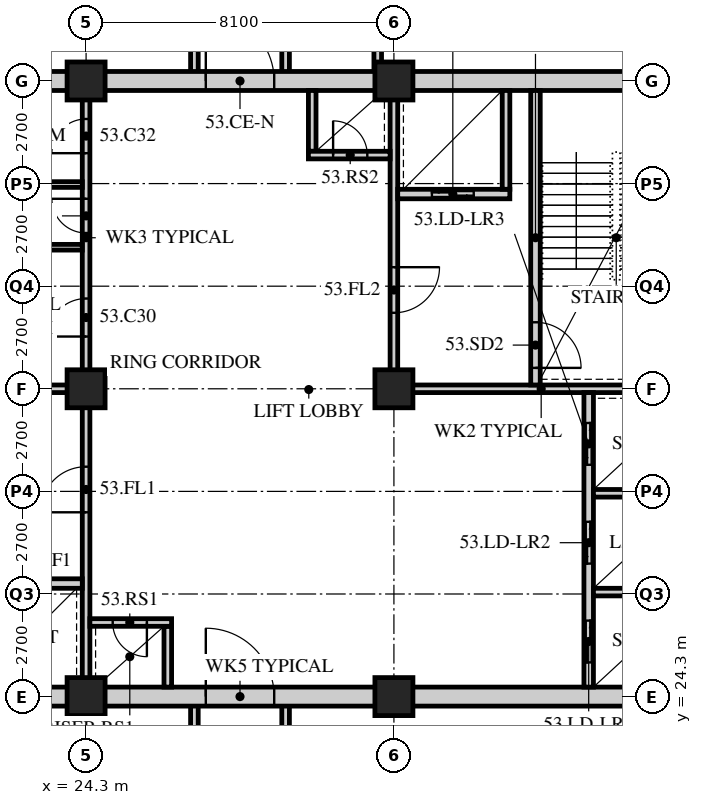
"""IFC4 building model, lengths in metres.
Left out: names, types, materials, properties, quantities, classifications, styles, units other than length and angle.
Written with IfcOpenShell. Run it as: python <this file> out.ifc"""

import sys

from ifc_helpers import new_model, si_unit, direction, frame, frame_2d, origin, origin_2d, place, context, subcontext, project, spatial, rectangle, hollow_rectangle, extrude, element, fill, save


model = new_model("IFC4")
c1 = context("Model", 3, precision=1e-05, world=origin(), true_north=direction((0.0, 1.0)))
c2 = subcontext(c1, "Body", "Model", "MODEL_VIEW")
j1 = project(units=[si_unit("LENGTHUNIT", "METRE"), si_unit("PLANEANGLEUNIT", "RADIAN")], contexts=[c1])
p1 = place(None, origin())
s1 = spatial("IfcSite", under=j1, at=p1, CompositionType="ELEMENT")
p2 = place(p1, origin())
s2 = spatial("IfcBuilding", under=s1, at=p2, CompositionType="ELEMENT")
p3 = place(p2, frame((0.0, 0.0, 206.4)))
s3 = spatial("IfcBuildingStorey", under=s2, at=p3, CompositionType="ELEMENT", Elevation=206.4)
for number, where, z_axis, x_axis in (
    (1, (24.3, 24.3, 0.0), (0.0, 0.0, 1.0), (1.0, 0.0, 0.0)),
    (2, (24.3, 32.4, 0.0), (0.0, 0.0, 1.0), (1.0, 0.0, 0.0)),
    (3, (24.3, 40.5, 0.0), (0.0, 0.0, 1.0), (1.0, 0.0, 0.0)),
    (4, (32.4, 24.3, 0.0), (0.0, 0.0, 1.0), (1.0, 0.0, 0.0)),
    (5, (32.4, 32.4, 0.0), (0.0, 0.0, 1.0), (1.0, 0.0, 0.0)),
    (6, (32.4, 40.5, 0.0), (0.0, 0.0, 1.0), (1.0, 0.0, 0.0)),
):
    element("IfcColumn", number, at=place(p3, frame(where, z_axis=z_axis, x_axis=x_axis)), inside=s3, PredefinedType="COLUMN", context=c2, shape_type="SweptSolid", body=[
        extrude(hollow_rectangle(XDim=1.0, YDim=1.0, WallThickness=0.1, at=origin_2d()), origin(), (0.0, 0.0, 1.0), 3.6),
    ])
for number, where, z_axis, x_axis in (
    (7, (27.15, 20.7, 0.0), (0.0, 0.0, 1.0), (0.0, 1.0, 0.0)),
    (8, (29.55, 20.7, 0.0), (0.0, 0.0, 1.0), (0.0, 1.0, 0.0)),
):
    element("IfcWall", number, at=place(p3, frame(where, z_axis=z_axis, x_axis=x_axis)), inside=s3, PredefinedType="SOLIDWALL", context=c2, shape_type="SweptSolid", body=[
        extrude(rectangle(XDim=3.6, YDim=0.2, at=frame_2d((1.8, 0.0))), origin(), (0.0, 0.0, 1.0), 3.39),
    ])
p4 = place(p3, frame((31.974, 45.45, 0.0), z_axis=(0.0, 0.0, 1.0), x_axis=(0.0, -1.0, 0.0)))
e9 = element("IfcWall", 9, at=p4, inside=s3, PredefinedType="SOLIDWALL", context=c2, shape_type="SweptSolid", body=[
    extrude(rectangle(XDim=4.95, YDim=0.2, at=frame_2d((2.475, 0.0))), origin(), (0.0, 0.0, 1.0), 2.69),
])
for number, where, z_axis, x_axis in (
    (10, (27.15, 40.5, 0.0), (0.0, 0.0, 1.0), (0.0, 1.0, 0.0)),
    (11, (29.55, 40.5, 0.0), (0.0, 0.0, 1.0), (0.0, 1.0, 0.0)),
):
    element("IfcWall", number, at=place(p3, frame(where, z_axis=z_axis, x_axis=x_axis)), inside=s3, PredefinedType="SOLIDWALL", context=c2, shape_type="SweptSolid", body=[
        extrude(rectangle(XDim=4.95, YDim=0.2, at=frame_2d((2.475, 0.0))), origin(), (0.0, 0.0, 1.0), 3.39),
    ])
p5 = place(p3, frame((15.95, 24.3, 0.0), z_axis=(0.0, 0.0, 1.0), x_axis=(1.0, 0.0, 0.0)))
e12 = element("IfcWall", 12, at=p5, inside=s3, PredefinedType="SOLIDWALL", context=c2, shape_type="SweptSolid", body=[
    extrude(rectangle(XDim=24.8, YDim=0.5, at=frame_2d((12.4, 0.0))), origin(), (0.0, 0.0, 1.0), 2.74),
])
p6 = place(p5, frame((11.5, 0.0, 0.0)))
e13 = element("IfcOpeningElement", 13, at=p6, cuts=e12, PredefinedType="OPENING", context=c2, shape_type="SweptSolid", body=[
    extrude(rectangle(XDim=1.8, YDim=2.4, at=frame_2d((0.9, 1.2))), frame((0.0, 0.26, 0.0), z_axis=(0.0, -1.0, 0.0), x_axis=(1.0, 0.0, 0.0)), (0.0, 0.0, 1.0), 0.52),
])
p7 = place(p3, frame((15.95, 40.5, 0.0), z_axis=(0.0, 0.0, 1.0), x_axis=(1.0, 0.0, 0.0)))
e14 = element("IfcWall", 14, at=p7, inside=s3, PredefinedType="SOLIDWALL", context=c2, shape_type="SweptSolid", body=[
    extrude(rectangle(XDim=24.8, YDim=0.5, at=frame_2d((12.4, 0.0))), origin(), (0.0, 0.0, 1.0), 2.74),
])
p8 = place(p7, frame((11.5, 0.0, 0.0)))
e15 = element("IfcOpeningElement", 15, at=p8, cuts=e14, PredefinedType="OPENING", context=c2, shape_type="SweptSolid", body=[
    extrude(rectangle(XDim=1.8, YDim=2.4, at=frame_2d((0.9, 1.2))), frame((0.0, 0.26, 0.0), z_axis=(0.0, -1.0, 0.0), x_axis=(1.0, 0.0, 0.0)), (0.0, 0.0, 1.0), 0.52),
])
p9 = place(p3, frame((16.45, 32.4, 0.0), z_axis=(0.0, 0.0, 1.0), x_axis=(1.0, 0.0, 0.0)))
e16 = element("IfcWall", 16, at=p9, inside=s3, PredefinedType="SOLIDWALL", context=c2, shape_type="SweptSolid", body=[
    extrude(rectangle(XDim=7.95, YDim=0.2, at=frame_2d((3.975, 0.0))), origin(), (0.0, 0.0, 1.0), 2.778),
])
p10 = place(p3, frame((24.3, 24.55, 0.0), z_axis=(0.0, 0.0, 1.0), x_axis=(0.0, 1.0, 0.0)))
e17 = element("IfcWall", 17, at=p10, inside=s3, PredefinedType="SOLIDWALL", context=c2, shape_type="SweptSolid", body=[
    extrude(rectangle(XDim=7.75, YDim=0.2, at=frame_2d((3.875, 0.0))), origin(), (0.0, 0.0, 1.0), 2.778),
])
p11 = place(p10, frame((4.6, 0.0, 0.0)))
e18 = element("IfcOpeningElement", 18, at=p11, cuts=e17, PredefinedType="OPENING", context=c2, shape_type="SweptSolid", body=[
    extrude(rectangle(XDim=1.2, YDim=2.1, at=frame_2d((0.6, 1.05))), frame((0.0, 0.11, 0.0), z_axis=(0.0, -1.0, 0.0), x_axis=(1.0, 0.0, 0.0)), (0.0, 0.0, 1.0), 0.22),
])
p12 = place(p3, frame((21.25, 27.275, 0.0), z_axis=(0.0, 0.0, 1.0), x_axis=(1.0, 0.0, 0.0)))
e19 = element("IfcWall", 19, at=p12, inside=s3, PredefinedType="SOLIDWALL", context=c2, shape_type="SweptSolid", body=[
    extrude(rectangle(XDim=2.95, YDim=0.25, at=frame_2d((1.475, 0.0))), origin(), (0.0, 0.0, 1.0), 3.39),
])
p13 = place(p12, frame((0.95, 0.0, 0.0)))
e20 = element("IfcOpeningElement", 20, at=p13, cuts=e19, PredefinedType="OPENING", context=c2, shape_type="SweptSolid", body=[
    extrude(rectangle(XDim=1.1, YDim=2.4, at=frame_2d((0.55, 1.2))), frame((0.0, 0.135, 0.0), z_axis=(0.0, -1.0, 0.0), x_axis=(1.0, 0.0, 0.0)), (0.0, 0.0, 1.0), 0.27),
])
p14 = place(p3, frame((26.45, 24.55, 0.0), z_axis=(0.0, 0.0, 1.0), x_axis=(0.0, 1.0, 0.0)))
e21 = element("IfcWall", 21, at=p14, inside=s3, PredefinedType="SOLIDWALL", context=c2, shape_type="SweptSolid", body=[
    extrude(rectangle(XDim=1.6, YDim=0.2, at=frame_2d((0.8, 0.0))), origin(), (0.0, 0.0, 1.0), 3.39),
])
p15 = place(p3, frame((24.4, 26.25, 0.0), z_axis=(0.0, 0.0, 1.0), x_axis=(1.0, 0.0, 0.0)))
e22 = element("IfcWall", 22, at=p15, inside=s3, PredefinedType="SOLIDWALL", context=c2, shape_type="SweptSolid", body=[
    extrude(rectangle(XDim=2.15, YDim=0.2, at=frame_2d((1.075, 0.0))), origin(), (0.0, 0.0, 1.0), 3.39),
])
p16 = place(p15, frame((0.6, 0.0, 0.0)))
e23 = element("IfcOpeningElement", 23, at=p16, cuts=e22, PredefinedType="OPENING", context=c2, shape_type="SweptSolid", body=[
    extrude(rectangle(XDim=0.9, YDim=2.1, at=frame_2d((0.45, 1.05))), frame((0.0, 0.11, 0.0), z_axis=(0.0, -1.0, 0.0), x_axis=(1.0, 0.0, 0.0)), (0.0, 0.0, 1.0), 0.22),
])
p17 = place(p3, frame((32.3, 32.4, 0.0), z_axis=(0.0, 0.0, 1.0), x_axis=(1.0, 0.0, 0.0)))
e24 = element("IfcWall", 24, at=p17, inside=s3, PredefinedType="SOLIDWALL", context=c2, shape_type="SweptSolid", body=[
    extrude(rectangle(XDim=7.95, YDim=0.2, at=frame_2d((3.975, 0.0))), origin(), (0.0, 0.0, 1.0), 2.778),
])
p18 = place(p3, frame((32.4, 32.5, 0.0), z_axis=(0.0, 0.0, 1.0), x_axis=(0.0, 1.0, 0.0)))
e25 = element("IfcWall", 25, at=p18, inside=s3, PredefinedType="SOLIDWALL", context=c2, shape_type="SweptSolid", body=[
    extrude(rectangle(XDim=7.75, YDim=0.2, at=frame_2d((3.875, 0.0))), origin(), (0.0, 0.0, 1.0), 2.778),
])
p19 = place(p18, frame((1.9, 0.0, 0.0)))
e26 = element("IfcOpeningElement", 26, at=p19, cuts=e25, PredefinedType="OPENING", context=c2, shape_type="SweptSolid", body=[
    extrude(rectangle(XDim=1.2, YDim=2.1, at=frame_2d((0.6, 1.05))), frame((0.0, 0.11, 0.0), z_axis=(0.0, -1.0, 0.0), x_axis=(1.0, 0.0, 0.0)), (0.0, 0.0, 1.0), 0.22),
])
p20 = place(p3, frame((37.525, 24.55, 0.0), z_axis=(0.0, 0.0, 1.0), x_axis=(0.0, 1.0, 0.0)))
e27 = element("IfcWall", 27, at=p20, inside=s3, PredefinedType="SOLIDWALL", context=c2, shape_type="SweptSolid", body=[
    extrude(rectangle(XDim=7.75, YDim=0.25, at=frame_2d((3.875, 0.0))), origin(), (0.0, 0.0, 1.0), 3.39),
])
p21 = place(p20, frame((0.65, 0.0, 0.0)))
e28 = element("IfcOpeningElement", 28, at=p21, cuts=e27, PredefinedType="OPENING", context=c2, shape_type="SweptSolid", body=[
    extrude(rectangle(XDim=1.1, YDim=2.4, at=frame_2d((0.55, 1.2))), frame((0.0, 0.135, 0.0), z_axis=(0.0, -1.0, 0.0), x_axis=(1.0, 0.0, 0.0)), (0.0, 0.0, 1.0), 0.27),
])
p22 = place(p20, frame((3.25, 0.0, 0.0)))
e29 = element("IfcOpeningElement", 29, at=p22, cuts=e27, PredefinedType="OPENING", context=c2, shape_type="SweptSolid", body=[
    extrude(rectangle(XDim=1.1, YDim=2.4, at=frame_2d((0.55, 1.2))), frame((0.0, 0.135, 0.0), z_axis=(0.0, -1.0, 0.0), x_axis=(1.0, 0.0, 0.0)), (0.0, 0.0, 1.0), 0.27),
])
p23 = place(p20, frame((5.85, 0.0, 0.0)))
e30 = element("IfcOpeningElement", 30, at=p23, cuts=e27, PredefinedType="OPENING", context=c2, shape_type="SweptSolid", body=[
    extrude(rectangle(XDim=1.1, YDim=2.4, at=frame_2d((0.55, 1.2))), frame((0.0, 0.135, 0.0), z_axis=(0.0, -1.0, 0.0), x_axis=(1.0, 0.0, 0.0)), (0.0, 0.0, 1.0), 0.27),
])
for number, where, z_axis, x_axis in (
    (31, (37.65, 27.05, 0.0), (0.0, 0.0, 1.0), (1.0, 0.0, 0.0)),
    (32, (37.65, 29.65, 0.0), (0.0, 0.0, 1.0), (1.0, 0.0, 0.0)),
):
    element("IfcWall", number, at=place(p3, frame(where, z_axis=z_axis, x_axis=x_axis)), inside=s3, PredefinedType="SOLIDWALL", context=c2, shape_type="SweptSolid", body=[
        extrude(rectangle(XDim=2.6, YDim=0.2, at=frame_2d((1.3, 0.0))), origin(), (0.0, 0.0, 1.0), 3.39),
    ])
p24 = place(p3, frame((36.125, 32.5, 0.0), z_axis=(0.0, 0.0, 1.0), x_axis=(0.0, 1.0, 0.0)))
e33 = element("IfcWall", 33, at=p24, inside=s3, PredefinedType="SOLIDWALL", context=c2, shape_type="SweptSolid", body=[
    extrude(rectangle(XDim=7.75, YDim=0.25, at=frame_2d((3.875, 0.0))), origin(), (0.0, 0.0, 1.0), 3.39),
])
p25 = place(p24, frame((0.45, 0.0, 0.0)))
e34 = element("IfcOpeningElement", 34, at=p25, cuts=e33, PredefinedType="OPENING", context=c2, shape_type="SweptSolid", body=[
    extrude(rectangle(XDim=1.2, YDim=2.1, at=frame_2d((0.6, 1.05))), frame((0.0, 0.135, 0.0), z_axis=(0.0, -1.0, 0.0), x_axis=(1.0, 0.0, 0.0)), (0.0, 0.0, 1.0), 0.27),
])
p26 = place(p3, frame((32.5, 37.525, 0.0), z_axis=(0.0, 0.0, 1.0), x_axis=(1.0, 0.0, 0.0)))
e35 = element("IfcWall", 35, at=p26, inside=s3, PredefinedType="SOLIDWALL", context=c2, shape_type="SweptSolid", body=[
    extrude(rectangle(XDim=2.95, YDim=0.25, at=frame_2d((1.475, 0.0))), origin(), (0.0, 0.0, 1.0), 3.39),
])
p27 = place(p26, frame((0.9, 0.0, 0.0)))
e36 = element("IfcOpeningElement", 36, at=p27, cuts=e35, PredefinedType="OPENING", context=c2, shape_type="SweptSolid", body=[
    extrude(rectangle(XDim=1.1, YDim=2.4, at=frame_2d((0.55, 1.2))), frame((0.0, 0.135, 0.0), z_axis=(0.0, -1.0, 0.0), x_axis=(1.0, 0.0, 0.0)), (0.0, 0.0, 1.0), 0.27),
])
p28 = place(p3, frame((35.35, 37.65, 0.0), z_axis=(0.0, 0.0, 1.0), x_axis=(0.0, 1.0, 0.0)))
e37 = element("IfcWall", 37, at=p28, inside=s3, PredefinedType="SOLIDWALL", context=c2, shape_type="SweptSolid", body=[
    extrude(rectangle(XDim=2.6, YDim=0.2, at=frame_2d((1.3, 0.0))), origin(), (0.0, 0.0, 1.0), 3.39),
])
p29 = place(p3, frame((30.25, 38.65, 0.0), z_axis=(0.0, 0.0, 1.0), x_axis=(0.0, 1.0, 0.0)))
e38 = element("IfcWall", 38, at=p29, inside=s3, PredefinedType="SOLIDWALL", context=c2, shape_type="SweptSolid", body=[
    extrude(rectangle(XDim=1.6, YDim=0.2, at=frame_2d((0.8, 0.0))), origin(), (0.0, 0.0, 1.0), 3.39),
])
p30 = place(p3, frame((30.15, 38.55, 0.0), z_axis=(0.0, 0.0, 1.0), x_axis=(1.0, 0.0, 0.0)))
e39 = element("IfcWall", 39, at=p30, inside=s3, PredefinedType="SOLIDWALL", context=c2, shape_type="SweptSolid", body=[
    extrude(rectangle(XDim=2.15, YDim=0.2, at=frame_2d((1.075, 0.0))), origin(), (0.0, 0.0, 1.0), 3.39),
])
p31 = place(p30, frame((0.65, 0.0, 0.0)))
e40 = element("IfcOpeningElement", 40, at=p31, cuts=e39, PredefinedType="OPENING", context=c2, shape_type="SweptSolid", body=[
    extrude(rectangle(XDim=0.9, YDim=2.1, at=frame_2d((0.45, 1.05))), frame((0.0, 0.11, 0.0), z_axis=(0.0, -1.0, 0.0), x_axis=(1.0, 0.0, 0.0)), (0.0, 0.0, 1.0), 0.22),
])
p32 = place(p3, frame((24.3, 32.5, 0.0), z_axis=(0.0, 0.0, 1.0), x_axis=(0.0, 1.0, 0.0)))
e41 = element("IfcWall", 41, at=p32, inside=s3, PredefinedType="PARTITIONING", context=c2, shape_type="SweptSolid", body=[
    extrude(rectangle(XDim=7.75, YDim=0.2, at=frame_2d((3.875, 0.0))), origin(), (0.0, 0.0, 1.0), 2.778),
])
p33 = place(p32, frame((1.275, 0.0, 0.0)))
e42 = element("IfcOpeningElement", 42, at=p33, cuts=e41, PredefinedType="OPENING", context=c2, shape_type="SweptSolid", body=[
    extrude(rectangle(XDim=1.0, YDim=2.1, at=frame_2d((0.5, 1.05))), frame((0.0, 0.11, 0.0), z_axis=(0.0, -1.0, 0.0), x_axis=(1.0, 0.0, 0.0)), (0.0, 0.0, 1.0), 0.22),
])
p34 = place(p32, frame((4.0, 0.0, 0.0)))
e43 = element("IfcOpeningElement", 43, at=p34, cuts=e41, PredefinedType="OPENING", context=c2, shape_type="SweptSolid", body=[
    extrude(rectangle(XDim=0.9, YDim=2.1, at=frame_2d((0.45, 1.05))), frame((0.0, 0.11, 0.0), z_axis=(0.0, -1.0, 0.0), x_axis=(1.0, 0.0, 0.0)), (0.0, 0.0, 1.0), 0.22),
])
p35 = place(p32, frame((6.1, 0.0, 0.0)))
e44 = element("IfcOpeningElement", 44, at=p35, cuts=e41, PredefinedType="OPENING", context=c2, shape_type="SweptSolid", body=[
    extrude(rectangle(XDim=0.9, YDim=2.1, at=frame_2d((0.45, 1.05))), frame((0.0, 0.11, 0.0), z_axis=(0.0, -1.0, 0.0), x_axis=(1.0, 0.0, 0.0)), (0.0, 0.0, 1.0), 0.22),
])
for number, where, z_axis, x_axis in (
    (45, (21.05, 36.125, 0.0), (0.0, 0.0, 1.0), (1.0, 0.0, 0.0)),
    (46, (21.05, 37.775, 0.0), (0.0, 0.0, 1.0), (1.0, 0.0, 0.0)),
):
    element("IfcWall", number, at=place(p3, frame(where, z_axis=z_axis, x_axis=x_axis)), inside=s3, PredefinedType="PARTITIONING", context=c2, shape_type="SweptSolid", body=[
        extrude(rectangle(XDim=3.15, YDim=0.15, at=frame_2d((1.575, 0.0))), origin(), (0.0, 0.0, 1.0), 3.39),
    ])
p36 = place(p33, origin())
e47 = element("IfcDoor", 47, at=p36, inside=s3, OperationType="SINGLE_SWING_LEFT", PredefinedType="DOOR", context=c2, shape_type="SweptSolid", body=[
    extrude(rectangle(XDim=1.0, YDim=2.1, at=frame_2d((0.5, 1.05))), frame((0.0, 0.025, 0.0), z_axis=(0.0, -1.0, 0.0), x_axis=(1.0, 0.0, 0.0)), (0.0, 0.0, 1.0), 0.05),
])
fill(e42, e47)
p37 = place(p34, origin())
e48 = element("IfcDoor", 48, at=p37, inside=s3, OperationType="SINGLE_SWING_RIGHT", PredefinedType="DOOR", context=c2, shape_type="SweptSolid", body=[
    extrude(rectangle(XDim=0.9, YDim=2.1, at=frame_2d((0.45, 1.05))), frame((0.0, 0.025, 0.0), z_axis=(0.0, -1.0, 0.0), x_axis=(1.0, 0.0, 0.0)), (0.0, 0.0, 1.0), 0.05),
])
fill(e43, e48)
p38 = place(p35, origin())
e49 = element("IfcDoor", 49, at=p38, inside=s3, OperationType="SINGLE_SWING_LEFT", PredefinedType="DOOR", context=c2, shape_type="SweptSolid", body=[
    extrude(rectangle(XDim=0.9, YDim=2.1, at=frame_2d((0.45, 1.05))), frame((0.0, 0.025, 0.0), z_axis=(0.0, -1.0, 0.0), x_axis=(1.0, 0.0, 0.0)), (0.0, 0.0, 1.0), 0.05),
])
fill(e44, e49)
p39 = place(p11, origin())
e50 = element("IfcDoor", 50, at=p39, inside=s3, OperationType="SINGLE_SWING_LEFT", PredefinedType="DOOR", context=c2, shape_type="SweptSolid", body=[
    extrude(rectangle(XDim=1.2, YDim=2.1, at=frame_2d((0.6, 1.05))), frame((0.0, 0.025, 0.0), z_axis=(0.0, -1.0, 0.0), x_axis=(1.0, 0.0, 0.0)), (0.0, 0.0, 1.0), 0.05),
])
fill(e18, e50)
p40 = place(p16, origin())
e51 = element("IfcDoor", 51, at=p40, inside=s3, OperationType="SINGLE_SWING_LEFT", PredefinedType="DOOR", context=c2, shape_type="SweptSolid", body=[
    extrude(rectangle(XDim=0.9, YDim=2.1, at=frame_2d((0.45, 1.05))), frame((0.0, 0.025, 0.0), z_axis=(0.0, -1.0, 0.0), x_axis=(1.0, 0.0, 0.0)), (0.0, 0.0, 1.0), 0.05),
])
fill(e23, e51)
p41 = place(p25, origin())
e52 = element("IfcDoor", 52, at=p41, inside=s3, OperationType="SINGLE_SWING_RIGHT", PredefinedType="DOOR", context=c2, shape_type="SweptSolid", body=[
    extrude(rectangle(XDim=1.2, YDim=2.1, at=frame_2d((0.6, 1.05))), frame((0.0, 0.025, 0.0), z_axis=(0.0, -1.0, 0.0), x_axis=(1.0, 0.0, 0.0)), (0.0, 0.0, 1.0), 0.05),
])
fill(e34, e52)
p42 = place(p19, origin())
e53 = element("IfcDoor", 53, at=p42, inside=s3, OperationType="SINGLE_SWING_LEFT", PredefinedType="DOOR", context=c2, shape_type="SweptSolid", body=[
    extrude(rectangle(XDim=1.2, YDim=2.1, at=frame_2d((0.6, 1.05))), frame((0.0, 0.025, 0.0), z_axis=(0.0, -1.0, 0.0), x_axis=(1.0, 0.0, 0.0)), (0.0, 0.0, 1.0), 0.05),
])
fill(e26, e53)
p43 = place(p31, origin())
e54 = element("IfcDoor", 54, at=p43, inside=s3, OperationType="SINGLE_SWING_LEFT", PredefinedType="DOOR", context=c2, shape_type="SweptSolid", body=[
    extrude(rectangle(XDim=0.9, YDim=2.1, at=frame_2d((0.45, 1.05))), frame((0.0, 0.025, 0.0), z_axis=(0.0, -1.0, 0.0), x_axis=(1.0, 0.0, 0.0)), (0.0, 0.0, 1.0), 0.05),
])
fill(e40, e54)
p44 = place(p21, origin())
e55 = element("IfcDoor", 55, at=p44, inside=s3, OperationType="DOUBLE_DOOR_SLIDING", PredefinedType="DOOR", context=c2, shape_type="SweptSolid", body=[
    extrude(rectangle(XDim=1.1, YDim=2.4, at=frame_2d((0.55, 1.2))), frame((0.0, 0.025, 0.0), z_axis=(0.0, -1.0, 0.0), x_axis=(1.0, 0.0, 0.0)), (0.0, 0.0, 1.0), 0.05),
])
fill(e28, e55)
p45 = place(p22, origin())
e56 = element("IfcDoor", 56, at=p45, inside=s3, OperationType="DOUBLE_DOOR_SLIDING", PredefinedType="DOOR", context=c2, shape_type="SweptSolid", body=[
    extrude(rectangle(XDim=1.1, YDim=2.4, at=frame_2d((0.55, 1.2))), frame((0.0, 0.025, 0.0), z_axis=(0.0, -1.0, 0.0), x_axis=(1.0, 0.0, 0.0)), (0.0, 0.0, 1.0), 0.05),
])
fill(e29, e56)
p46 = place(p23, origin())
e57 = element("IfcDoor", 57, at=p46, inside=s3, OperationType="DOUBLE_DOOR_SLIDING", PredefinedType="DOOR", context=c2, shape_type="SweptSolid", body=[
    extrude(rectangle(XDim=1.1, YDim=2.4, at=frame_2d((0.55, 1.2))), frame((0.0, 0.025, 0.0), z_axis=(0.0, -1.0, 0.0), x_axis=(1.0, 0.0, 0.0)), (0.0, 0.0, 1.0), 0.05),
])
fill(e30, e57)
p47 = place(p27, origin())
e58 = element("IfcDoor", 58, at=p47, inside=s3, OperationType="DOUBLE_DOOR_SLIDING", PredefinedType="DOOR", context=c2, shape_type="SweptSolid", body=[
    extrude(rectangle(XDim=1.1, YDim=2.4, at=frame_2d((0.55, 1.2))), frame((0.0, 0.025, 0.0), z_axis=(0.0, -1.0, 0.0), x_axis=(1.0, 0.0, 0.0)), (0.0, 0.0, 1.0), 0.05),
])
fill(e36, e58)
p48 = place(p6, origin())
e59 = element("IfcDoor", 59, at=p48, inside=s3, OperationType="DOUBLE_DOOR_SINGLE_SWING", PredefinedType="DOOR", context=c2, shape_type="SweptSolid", body=[
    extrude(rectangle(XDim=1.8, YDim=2.4, at=frame_2d((0.9, 1.2))), frame((0.0, 0.025, 0.0), z_axis=(0.0, -1.0, 0.0), x_axis=(1.0, 0.0, 0.0)), (0.0, 0.0, 1.0), 0.05),
])
fill(e13, e59)
p49 = place(p8, origin())
e60 = element("IfcDoor", 60, at=p49, inside=s3, OperationType="DOUBLE_DOOR_SINGLE_SWING", PredefinedType="DOOR", context=c2, shape_type="SweptSolid", body=[
    extrude(rectangle(XDim=1.8, YDim=2.4, at=frame_2d((0.9, 1.2))), frame((0.0, 0.025, 0.0), z_axis=(0.0, -1.0, 0.0), x_axis=(1.0, 0.0, 0.0)), (0.0, 0.0, 1.0), 0.05),
])
fill(e15, e60)
save(model, sys.argv[1])
